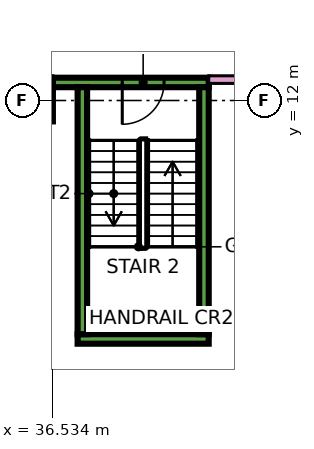
"""IFC4 building model, lengths in metres.
Left out: names, types, materials, properties, quantities, classifications, styles, units other than length and angle.
Written with IfcOpenShell. Run it as: python <this file> out.ifc"""

import sys

from ifc_helpers import new_model, si_unit, direction, frame, frame_2d, origin, origin_2d, place, context, subcontext, project, spatial, rectangle, extrude, element, fill, save


model = new_model("IFC4")
c1 = context("Model", 3, precision=1e-05, world=origin(), true_north=direction((0.0, 1.0)))
c2 = subcontext(c1, "Body", "Model", "MODEL_VIEW")
j1 = project(units=[si_unit("LENGTHUNIT", "METRE"), si_unit("PLANEANGLEUNIT", "RADIAN")], contexts=[c1])
p1 = place(None, origin())
s1 = spatial("IfcSite", under=j1, at=p1, CompositionType="ELEMENT")
p2 = place(p1, origin())
s2 = spatial("IfcBuilding", under=s1, at=p2, CompositionType="ELEMENT")
p3 = place(p2, frame((0.0, 0.0, 48.9)))
s3 = spatial("IfcBuildingStorey", under=s2, at=p3, CompositionType="ELEMENT", Elevation=48.9)
p4 = place(p3, frame((36.0, 12.0, 0.0), z_axis=(0.0, 0.0, 1.0), x_axis=(1.0, 0.0, 0.0)))
e1 = element("IfcColumn", 1, at=p4, inside=s3, PredefinedType="COLUMN", context=c2, shape_type="SweptSolid", body=[
    extrude(rectangle(XDim=1.1, YDim=1.1, at=origin_2d()), origin(), (0.0, 0.0, 1.0), 3.75),
])
p5 = place(p3, frame((37.2, 5.725, 0.0), z_axis=(0.0, 0.0, 1.0), x_axis=(1.0, 0.0, 0.0)))
e2 = element("IfcWall", 2, at=p5, inside=s3, PredefinedType="SHEAR", context=c2, shape_type="SweptSolid", body=[
    extrude(rectangle(XDim=3.45, YDim=0.25, at=frame_2d((1.725, 0.0))), origin(), (0.0, 0.0, 1.0), 3.75),
])
p6 = place(p3, frame((36.55, 12.475, 0.0), z_axis=(0.0, 0.0, 1.0), x_axis=(1.0, 0.0, 0.0)))
e3 = element("IfcWall", 3, at=p6, inside=s3, PredefinedType="SHEAR", context=c2, shape_type="SweptSolid", body=[
    extrude(rectangle(XDim=4.1, YDim=0.25, at=frame_2d((2.05, 0.0))), origin(), (0.0, 0.0, 1.0), 3.75),
])
p7 = place(p6, frame((1.825, 0.0, 0.0)))
e4 = element("IfcOpeningElement", 4, at=p7, cuts=e3, PredefinedType="OPENING", context=c2, shape_type="SweptSolid", body=[
    extrude(rectangle(XDim=1.1, YDim=2.2, at=frame_2d((0.55, 1.1))), frame((0.0, 0.135, 0.0), z_axis=(0.0, -1.0, 0.0), x_axis=(1.0, 0.0, 0.0)), (0.0, 0.0, 1.0), 0.27),
])
for number, where, z_axis, x_axis in (
    (5, (37.325, 5.85, 0.0), (0.0, 0.0, 1.0), (0.0, 1.0, 0.0)),
    (6, (40.525, 5.85, 0.0), (0.0, 0.0, 1.0), (0.0, 1.0, 0.0)),
):
    element("IfcWall", number, at=place(p3, frame(where, z_axis=z_axis, x_axis=x_axis)), inside=s3, PredefinedType="SHEAR", context=c2, shape_type="SweptSolid", body=[
        extrude(rectangle(XDim=6.5, YDim=0.25, at=frame_2d((3.25, 0.0))), origin(), (0.0, 0.0, 1.0), 3.75),
    ])
p8 = place(p3, frame((34.0, 12.55, 0.0), z_axis=(0.0, 0.0, 1.0), x_axis=(1.0, 0.0, 0.0)))
e7 = element("IfcWall", 7, at=p8, inside=s3, PredefinedType="PARTITIONING", context=c2, shape_type="SweptSolid", body=[
    extrude(rectangle(XDim=2.551, YDim=0.2, at=frame_2d((1.275, 0.0))), origin(), (0.0, 0.0, 1.0), 3.35),
])
p9 = place(p3, frame((40.65, 12.55, 0.0), z_axis=(0.0, 0.0, 1.0), x_axis=(1.0, 0.0, 0.0)))
e8 = element("IfcWall", 8, at=p9, inside=s3, PredefinedType="PARTITIONING", context=c2, shape_type="SweptSolid", body=[
    extrude(rectangle(XDim=31.35, YDim=0.2, at=frame_2d((15.675, 0.0))), origin(), (0.0, 0.0, 1.0), 3.35),
])
p10 = place(p9, frame((24.0, 0.0, 0.0)))
e9 = element("IfcOpeningElement", 9, at=p10, cuts=e8, PredefinedType="OPENING", context=c2, shape_type="SweptSolid", body=[
    extrude(rectangle(XDim=1.0, YDim=2.1, at=frame_2d((0.5, 1.05))), frame((0.0, 0.11, 0.0), z_axis=(0.0, -1.0, 0.0), x_axis=(1.0, 0.0, 0.0)), (0.0, 0.0, 1.0), 0.22),
])
p11 = place(p9, frame((1.05, 0.0, 0.0)))
e10 = element("IfcOpeningElement", 10, at=p11, cuts=e8, PredefinedType="OPENING", context=c2, shape_type="SweptSolid", body=[
    extrude(rectangle(XDim=1.0, YDim=2.1, at=frame_2d((0.5, 1.05))), frame((0.0, 0.11, 0.0), z_axis=(0.0, -1.0, 0.0), x_axis=(1.0, 0.0, 0.0)), (0.0, 0.0, 1.0), 0.22),
])
p12 = place(p7, frame((1.1, 0.0, 0.0), z_axis=(0.0, 0.0, 1.0), x_axis=(-1.0, 0.0, 0.0)))
e11 = element("IfcDoor", 11, at=p12, inside=s3, OperationType="SINGLE_SWING_LEFT", PredefinedType="DOOR", context=c2, shape_type="SweptSolid", body=[
    extrude(rectangle(XDim=1.1, YDim=2.2, at=frame_2d((0.55, 1.1))), frame((0.0, 0.025, 0.0), z_axis=(0.0, -1.0, 0.0), x_axis=(1.0, 0.0, 0.0)), (0.0, 0.0, 1.0), 0.05),
])
fill(e4, e11)
save(model, sys.argv[1])
